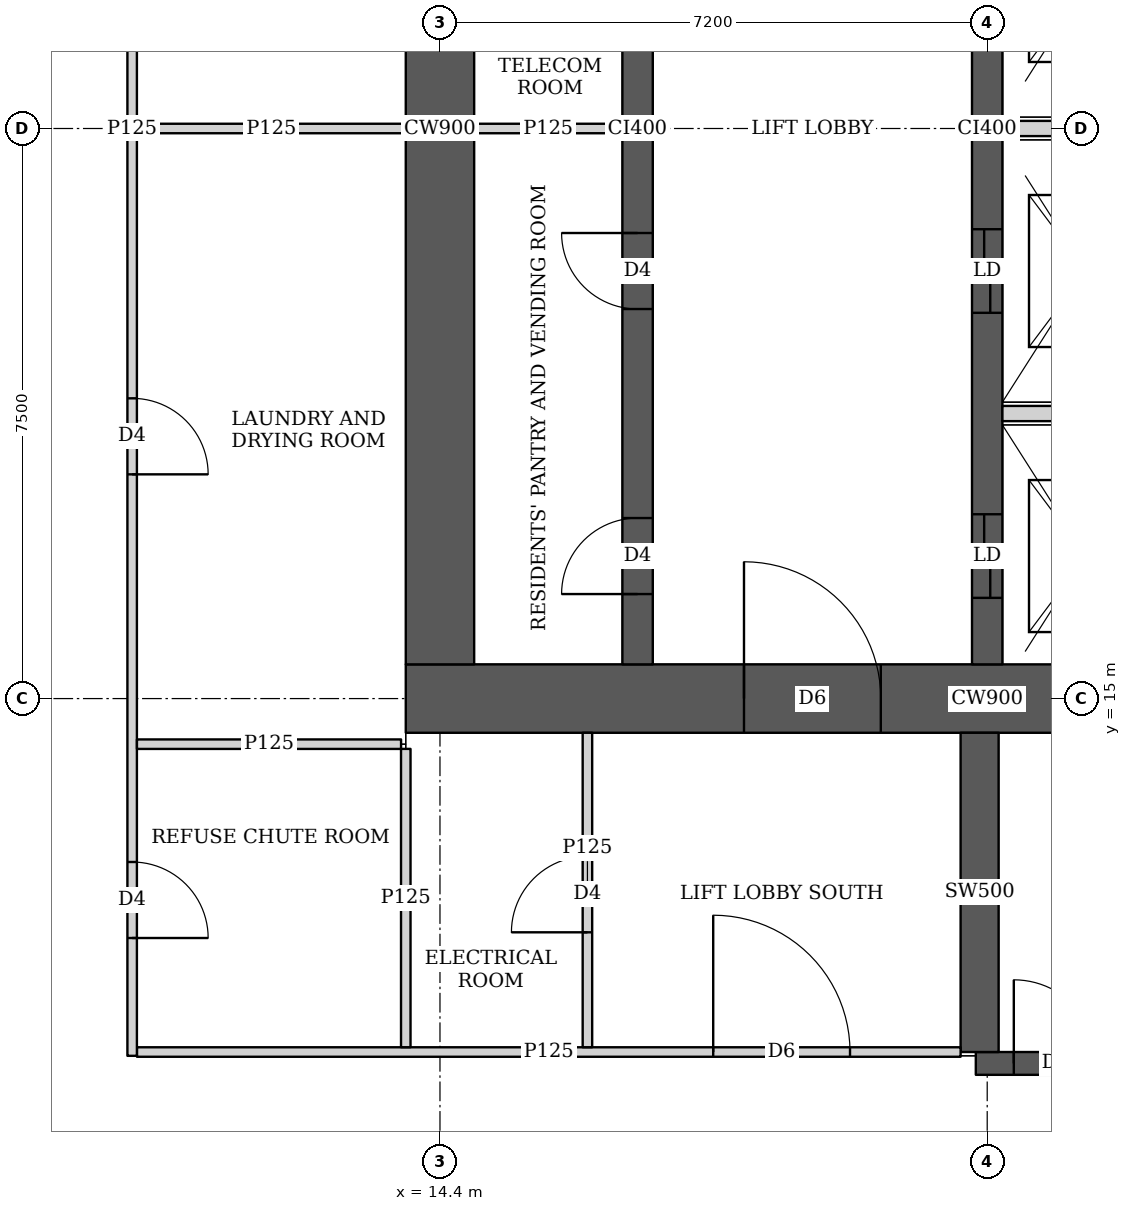
"""IFC4 building model, lengths in metres.
Left out: names, types, materials, properties, quantities, classifications, styles, units other than length and angle.
Written with IfcOpenShell. Run it as: python <this file> out.ifc"""

import sys

from ifc_helpers import new_model, si_unit, direction, frame, frame_2d, origin, place, context, subcontext, project, spatial, rectangle, extrude, element, fill, save


model = new_model("IFC4")
c1 = context("Model", 3, precision=1e-05, world=origin(), true_north=direction((0.0, 1.0)))
c2 = subcontext(c1, "Body", "Model", "MODEL_VIEW")
j1 = project(units=[si_unit("LENGTHUNIT", "METRE"), si_unit("PLANEANGLEUNIT", "RADIAN")], contexts=[c1])
p1 = place(None, origin())
s1 = spatial("IfcSite", under=j1, at=p1, CompositionType="ELEMENT")
p2 = place(p1, origin())
s2 = spatial("IfcBuilding", under=s1, at=p2, CompositionType="ELEMENT")
p3 = place(p2, frame((0.0, 0.0, 184.55)))
s3 = spatial("IfcBuildingStorey", under=s2, at=p3, CompositionType="ELEMENT", Elevation=184.55)
p4 = place(p3, frame((13.95, 15.0, 0.0), z_axis=(0.0, 0.0, 1.0), x_axis=(1.0, 0.0, 0.0)))
e1 = element("IfcWall", 1, at=p4, inside=s3, PredefinedType="SHEAR", context=c2, shape_type="SweptSolid", body=[
    extrude(rectangle(XDim=15.3, YDim=0.9, at=frame_2d((7.65, 0.0))), origin(), (0.0, 0.0, 1.0), 3.75),
])
p5 = place(p4, frame((4.45, 0.0, 0.0)))
e2 = element("IfcOpeningElement", 2, at=p5, cuts=e1, PredefinedType="OPENING", context=c2, shape_type="SweptSolid", body=[
    extrude(rectangle(XDim=1.8, YDim=2.1, at=frame_2d((0.9, 1.05))), frame((0.0, 0.46, 0.0), z_axis=(0.0, -1.0, 0.0), x_axis=(1.0, 0.0, 0.0)), (0.0, 0.0, 1.0), 0.92),
])
p6 = place(p4, frame((10.7, 0.0, 0.0)))
e3 = element("IfcOpeningElement", 3, at=p6, cuts=e1, PredefinedType="OPENING", context=c2, shape_type="SweptSolid", body=[
    extrude(rectangle(XDim=1.1, YDim=2.1, at=frame_2d((0.55, 1.05))), frame((0.0, 0.46, 0.0), z_axis=(0.0, -1.0, 0.0), x_axis=(1.0, 0.0, 0.0)), (0.0, 0.0, 1.0), 0.92),
])
p7 = place(p3, frame((14.4, 15.45, 0.0), z_axis=(0.0, 0.0, 1.0), x_axis=(0.0, 1.0, 0.0)))
e4 = element("IfcWall", 4, at=p7, inside=s3, PredefinedType="SHEAR", context=c2, shape_type="SweptSolid", body=[
    extrude(rectangle(XDim=14.1, YDim=0.9, at=frame_2d((7.05, 0.0))), origin(), (0.0, 0.0, 1.0), 3.75),
])
p8 = place(p3, frame((17.0, 15.45, 0.0), z_axis=(0.0, 0.0, 1.0), x_axis=(0.0, 1.0, 0.0)))
e5 = element("IfcWall", 5, at=p8, inside=s3, PredefinedType="SHEAR", context=c2, shape_type="SweptSolid", body=[
    extrude(rectangle(XDim=14.1, YDim=0.4, at=frame_2d((7.05, 0.0))), origin(), (0.0, 0.0, 1.0), 3.75),
])
p9 = place(p8, frame((0.925, 0.0, 0.0)))
e6 = element("IfcOpeningElement", 6, at=p9, cuts=e5, PredefinedType="OPENING", context=c2, shape_type="SweptSolid", body=[
    extrude(rectangle(XDim=1.0, YDim=2.1, at=frame_2d((0.5, 1.05))), frame((0.0, 0.21, 0.0), z_axis=(0.0, -1.0, 0.0), x_axis=(1.0, 0.0, 0.0)), (0.0, 0.0, 1.0), 0.42),
])
p10 = place(p8, frame((4.675, 0.0, 0.0)))
e7 = element("IfcOpeningElement", 7, at=p10, cuts=e5, PredefinedType="OPENING", context=c2, shape_type="SweptSolid", body=[
    extrude(rectangle(XDim=1.0, YDim=2.1, at=frame_2d((0.5, 1.05))), frame((0.0, 0.21, 0.0), z_axis=(0.0, -1.0, 0.0), x_axis=(1.0, 0.0, 0.0)), (0.0, 0.0, 1.0), 0.42),
])
p11 = place(p8, frame((8.425, 0.0, 0.0)))
e8 = element("IfcOpeningElement", 8, at=p11, cuts=e5, PredefinedType="OPENING", context=c2, shape_type="SweptSolid", body=[
    extrude(rectangle(XDim=1.0, YDim=2.1, at=frame_2d((0.5, 1.05))), frame((0.0, 0.21, 0.0), z_axis=(0.0, -1.0, 0.0), x_axis=(1.0, 0.0, 0.0)), (0.0, 0.0, 1.0), 0.42),
])
p12 = place(p8, frame((12.175, 0.0, 0.0)))
e9 = element("IfcOpeningElement", 9, at=p12, cuts=e5, PredefinedType="OPENING", context=c2, shape_type="SweptSolid", body=[
    extrude(rectangle(XDim=1.0, YDim=2.1, at=frame_2d((0.5, 1.05))), frame((0.0, 0.21, 0.0), z_axis=(0.0, -1.0, 0.0), x_axis=(1.0, 0.0, 0.0)), (0.0, 0.0, 1.0), 0.42),
])
p13 = place(p3, frame((21.6, 15.45, 0.0), z_axis=(0.0, 0.0, 1.0), x_axis=(0.0, 1.0, 0.0)))
e10 = element("IfcWall", 10, at=p13, inside=s3, PredefinedType="SHEAR", context=c2, shape_type="SweptSolid", body=[
    extrude(rectangle(XDim=14.1, YDim=0.4, at=frame_2d((7.05, 0.0))), origin(), (0.0, 0.0, 1.0), 3.75),
])
p14 = place(p13, frame((0.875, 0.0, 0.0)))
e11 = element("IfcOpeningElement", 11, at=p14, cuts=e10, PredefinedType="OPENING", context=c2, shape_type="SweptSolid", body=[
    extrude(rectangle(XDim=1.1, YDim=2.1, at=frame_2d((0.55, 1.05))), frame((0.0, 0.21, 0.0), z_axis=(0.0, -1.0, 0.0), x_axis=(1.0, 0.0, 0.0)), (0.0, 0.0, 1.0), 0.42),
])
p15 = place(p13, frame((4.625, 0.0, 0.0)))
e12 = element("IfcOpeningElement", 12, at=p15, cuts=e10, PredefinedType="OPENING", context=c2, shape_type="SweptSolid", body=[
    extrude(rectangle(XDim=1.1, YDim=2.1, at=frame_2d((0.55, 1.05))), frame((0.0, 0.21, 0.0), z_axis=(0.0, -1.0, 0.0), x_axis=(1.0, 0.0, 0.0)), (0.0, 0.0, 1.0), 0.42),
])
p16 = place(p13, frame((8.375, 0.0, 0.0)))
e13 = element("IfcOpeningElement", 13, at=p16, cuts=e10, PredefinedType="OPENING", context=c2, shape_type="SweptSolid", body=[
    extrude(rectangle(XDim=1.1, YDim=2.1, at=frame_2d((0.55, 1.05))), frame((0.0, 0.21, 0.0), z_axis=(0.0, -1.0, 0.0), x_axis=(1.0, 0.0, 0.0)), (0.0, 0.0, 1.0), 0.42),
])
p17 = place(p13, frame((12.125, 0.0, 0.0)))
e14 = element("IfcOpeningElement", 14, at=p17, cuts=e10, PredefinedType="OPENING", context=c2, shape_type="SweptSolid", body=[
    extrude(rectangle(XDim=1.1, YDim=2.1, at=frame_2d((0.55, 1.05))), frame((0.0, 0.21, 0.0), z_axis=(0.0, -1.0, 0.0), x_axis=(1.0, 0.0, 0.0)), (0.0, 0.0, 1.0), 0.42),
])
p18 = place(p3, frame((21.45, 10.2, 0.0), z_axis=(0.0, 0.0, 1.0), x_axis=(1.0, 0.0, 0.0)))
e15 = element("IfcWall", 15, at=p18, inside=s3, PredefinedType="SHEAR", context=c2, shape_type="SweptSolid", body=[
    extrude(rectangle(XDim=7.5, YDim=0.3, at=frame_2d((3.75, 0.0))), origin(), (0.0, 0.0, 1.0), 3.75),
])
p19 = place(p18, frame((0.5, 0.0, 0.0)))
e16 = element("IfcOpeningElement", 16, at=p19, cuts=e15, PredefinedType="OPENING", context=c2, shape_type="SweptSolid", body=[
    extrude(rectangle(XDim=1.1, YDim=2.1, at=frame_2d((0.55, 1.05))), frame((0.0, 0.16, 0.0), z_axis=(0.0, -1.0, 0.0), x_axis=(1.0, 0.0, 0.0)), (0.0, 0.0, 1.0), 0.32),
])
p20 = place(p3, frame((21.5, 10.35, 0.0), z_axis=(0.0, 0.0, 1.0), x_axis=(0.0, 1.0, 0.0)))
e17 = element("IfcWall", 17, at=p20, inside=s3, PredefinedType="SHEAR", context=c2, shape_type="SweptSolid", body=[
    extrude(rectangle(XDim=4.2, YDim=0.5, at=frame_2d((2.1, 0.0))), origin(), (0.0, 0.0, 1.0), 3.75),
])
p21 = place(p3, frame((10.35, 10.3, 0.0), z_axis=(0.0, 0.0, 1.0), x_axis=(0.0, 1.0, 0.0)))
e18 = element("IfcWall", 18, at=p21, inside=s3, PredefinedType="PARTITIONING", context=c2, shape_type="SweptSolid", body=[
    extrude(rectangle(XDim=24.4, YDim=0.125, at=frame_2d((12.2, 0.0))), origin(), (0.0, 0.0, 1.0), 3.45),
])
p22 = place(p21, frame((1.55, 0.0, 0.0)))
e19 = element("IfcOpeningElement", 19, at=p22, cuts=e18, PredefinedType="OPENING", context=c2, shape_type="SweptSolid", body=[
    extrude(rectangle(XDim=1.0, YDim=2.1, at=frame_2d((0.5, 1.05))), frame((0.0, 0.073, 0.0), z_axis=(0.0, -1.0, 0.0), x_axis=(1.0, 0.0, 0.0)), (0.0, 0.0, 1.0), 0.145),
])
p23 = place(p21, frame((7.65, 0.0, 0.0)))
e20 = element("IfcOpeningElement", 20, at=p23, cuts=e18, PredefinedType="OPENING", context=c2, shape_type="SweptSolid", body=[
    extrude(rectangle(XDim=1.0, YDim=2.1, at=frame_2d((0.5, 1.05))), frame((0.0, 0.073, 0.0), z_axis=(0.0, -1.0, 0.0), x_axis=(1.0, 0.0, 0.0)), (0.0, 0.0, 1.0), 0.145),
])
p24 = place(p21, frame((15.75, 0.0, 0.0)))
e21 = element("IfcOpeningElement", 21, at=p24, cuts=e18, PredefinedType="OPENING", context=c2, shape_type="SweptSolid", body=[
    extrude(rectangle(XDim=1.0, YDim=2.1, at=frame_2d((0.5, 1.05))), frame((0.0, 0.073, 0.0), z_axis=(0.0, -1.0, 0.0), x_axis=(1.0, 0.0, 0.0)), (0.0, 0.0, 1.0), 0.145),
])
p25 = place(p21, frame((21.85, 0.0, 0.0)))
e22 = element("IfcOpeningElement", 22, at=p25, cuts=e18, PredefinedType="OPENING", context=c2, shape_type="SweptSolid", body=[
    extrude(rectangle(XDim=1.0, YDim=2.1, at=frame_2d((0.5, 1.05))), frame((0.0, 0.073, 0.0), z_axis=(0.0, -1.0, 0.0), x_axis=(1.0, 0.0, 0.0)), (0.0, 0.0, 1.0), 0.145),
])
p26 = place(p3, frame((10.413, 14.4, 0.0), z_axis=(0.0, 0.0, 1.0), x_axis=(1.0, 0.0, 0.0)))
e23 = element("IfcWall", 23, at=p26, inside=s3, PredefinedType="PARTITIONING", context=c2, shape_type="SweptSolid", body=[
    extrude(rectangle(XDim=3.475, YDim=0.125, at=frame_2d((1.737, 0.0))), origin(), (0.0, 0.0, 1.0), 3.45),
])
p27 = place(p3, frame((10.413, 22.5, 0.0), z_axis=(0.0, 0.0, 1.0), x_axis=(1.0, 0.0, 0.0)))
e24 = element("IfcWall", 24, at=p27, inside=s3, PredefinedType="PARTITIONING", context=c2, shape_type="SweptSolid", body=[
    extrude(rectangle(XDim=3.537, YDim=0.125, at=frame_2d((1.769, 0.0))), origin(), (0.0, 0.0, 1.0), 3.45),
])
p28 = place(p3, frame((13.95, 10.413, 0.0), z_axis=(0.0, 0.0, 1.0), x_axis=(0.0, 1.0, 0.0)))
e25 = element("IfcWall", 25, at=p28, inside=s3, PredefinedType="PARTITIONING", context=c2, shape_type="SweptSolid", body=[
    extrude(rectangle(XDim=3.925, YDim=0.125, at=frame_2d((1.962, 0.0))), origin(), (0.0, 0.0, 1.0), 3.45),
])
p29 = place(p3, frame((10.413, 10.35, 0.0), z_axis=(0.0, 0.0, 1.0), x_axis=(1.0, 0.0, 0.0)))
e26 = element("IfcWall", 26, at=p29, inside=s3, PredefinedType="PARTITIONING", context=c2, shape_type="SweptSolid", body=[
    extrude(rectangle(XDim=10.837, YDim=0.125, at=frame_2d((5.418, 0.0))), origin(), (0.0, 0.0, 1.0), 3.45),
])
p30 = place(p29, frame((7.582, 0.0, 0.0)))
e27 = element("IfcOpeningElement", 27, at=p30, cuts=e26, PredefinedType="OPENING", context=c2, shape_type="SweptSolid", body=[
    extrude(rectangle(XDim=1.8, YDim=2.1, at=frame_2d((0.9, 1.05))), frame((0.0, 0.073, 0.0), z_axis=(0.0, -1.0, 0.0), x_axis=(1.0, 0.0, 0.0)), (0.0, 0.0, 1.0), 0.145),
])
p31 = place(p3, frame((16.34, 10.413, 0.0), z_axis=(0.0, 0.0, 1.0), x_axis=(0.0, 1.0, 0.0)))
e28 = element("IfcWall", 28, at=p31, inside=s3, PredefinedType="PARTITIONING", context=c2, shape_type="SweptSolid", body=[
    extrude(rectangle(XDim=4.137, YDim=0.125, at=frame_2d((2.068, 0.0))), origin(), (0.0, 0.0, 1.0), 3.45),
])
p32 = place(p31, frame((1.512, 0.0, 0.0)))
e29 = element("IfcOpeningElement", 29, at=p32, cuts=e28, PredefinedType="OPENING", context=c2, shape_type="SweptSolid", body=[
    extrude(rectangle(XDim=1.0, YDim=2.1, at=frame_2d((0.5, 1.05))), frame((0.0, 0.073, 0.0), z_axis=(0.0, -1.0, 0.0), x_axis=(1.0, 0.0, 0.0)), (0.0, 0.0, 1.0), 0.145),
])
p33 = place(p3, frame((14.85, 22.5, 0.0), z_axis=(0.0, 0.0, 1.0), x_axis=(1.0, 0.0, 0.0)))
e30 = element("IfcWall", 30, at=p33, inside=s3, PredefinedType="PARTITIONING", context=c2, shape_type="SweptSolid", body=[
    extrude(rectangle(XDim=1.95, YDim=0.125, at=frame_2d((0.975, 0.0))), origin(), (0.0, 0.0, 1.0), 3.45),
])
for number, where, z_axis, x_axis in (
    (31, (21.8, 18.75, 0.0), (0.0, 0.0, 1.0), (1.0, 0.0, 0.0)),
    (32, (21.8, 22.5, 0.0), (0.0, 0.0, 1.0), (1.0, 0.0, 0.0)),
):
    element("IfcWall", number, at=place(p3, frame(where, z_axis=z_axis, x_axis=x_axis)), inside=s3, PredefinedType="SOLIDWALL", context=c2, shape_type="SweptSolid", body=[
        extrude(rectangle(XDim=2.2, YDim=0.2, at=frame_2d((1.1, 0.0))), origin(), (0.0, 0.0, 1.0), 3.45),
    ])
p34 = place(p22, origin())
e33 = element("IfcDoor", 33, at=p34, inside=s3, OperationType="SINGLE_SWING_RIGHT", PredefinedType="DOOR", context=c2, shape_type="SweptSolid", body=[
    extrude(rectangle(XDim=1.0, YDim=2.1, at=frame_2d((0.5, 1.05))), frame((0.0, 0.025, 0.0), z_axis=(0.0, -1.0, 0.0), x_axis=(1.0, 0.0, 0.0)), (0.0, 0.0, 1.0), 0.05),
])
fill(e19, e33)
p35 = place(p23, origin())
e34 = element("IfcDoor", 34, at=p35, inside=s3, OperationType="SINGLE_SWING_RIGHT", PredefinedType="DOOR", context=c2, shape_type="SweptSolid", body=[
    extrude(rectangle(XDim=1.0, YDim=2.1, at=frame_2d((0.5, 1.05))), frame((0.0, 0.025, 0.0), z_axis=(0.0, -1.0, 0.0), x_axis=(1.0, 0.0, 0.0)), (0.0, 0.0, 1.0), 0.05),
])
fill(e20, e34)
p36 = place(p32, origin())
e35 = element("IfcDoor", 35, at=p36, inside=s3, OperationType="SINGLE_SWING_LEFT", PredefinedType="DOOR", context=c2, shape_type="SweptSolid", body=[
    extrude(rectangle(XDim=1.0, YDim=2.1, at=frame_2d((0.5, 1.05))), frame((0.0, 0.025, 0.0), z_axis=(0.0, -1.0, 0.0), x_axis=(1.0, 0.0, 0.0)), (0.0, 0.0, 1.0), 0.05),
])
fill(e29, e35)
p37 = place(p30, origin())
e36 = element("IfcDoor", 36, at=p37, inside=s3, OperationType="DOUBLE_DOOR_SINGLE_SWING", PredefinedType="DOOR", context=c2, shape_type="SweptSolid", body=[
    extrude(rectangle(XDim=1.8, YDim=2.1, at=frame_2d((0.9, 1.05))), frame((0.0, 0.025, 0.0), z_axis=(0.0, -1.0, 0.0), x_axis=(1.0, 0.0, 0.0)), (0.0, 0.0, 1.0), 0.05),
])
fill(e27, e36)
p38 = place(p9, origin())
e37 = element("IfcDoor", 37, at=p38, inside=s3, OperationType="SINGLE_SWING_LEFT", PredefinedType="DOOR", context=c2, shape_type="SweptSolid", body=[
    extrude(rectangle(XDim=1.0, YDim=2.1, at=frame_2d((0.5, 1.05))), frame((0.0, 0.025, 0.0), z_axis=(0.0, -1.0, 0.0), x_axis=(1.0, 0.0, 0.0)), (0.0, 0.0, 1.0), 0.05),
])
fill(e6, e37)
p39 = place(p10, origin())
e38 = element("IfcDoor", 38, at=p39, inside=s3, OperationType="SINGLE_SWING_RIGHT", PredefinedType="DOOR", context=c2, shape_type="SweptSolid", body=[
    extrude(rectangle(XDim=1.0, YDim=2.1, at=frame_2d((0.5, 1.05))), frame((0.0, 0.025, 0.0), z_axis=(0.0, -1.0, 0.0), x_axis=(1.0, 0.0, 0.0)), (0.0, 0.0, 1.0), 0.05),
])
fill(e7, e38)
p40 = place(p5, origin())
e39 = element("IfcDoor", 39, at=p40, inside=s3, OperationType="DOUBLE_DOOR_SINGLE_SWING", PredefinedType="DOOR", context=c2, shape_type="SweptSolid", body=[
    extrude(rectangle(XDim=1.8, YDim=2.1, at=frame_2d((0.9, 1.05))), frame((0.0, 0.025, 0.0), z_axis=(0.0, -1.0, 0.0), x_axis=(1.0, 0.0, 0.0)), (0.0, 0.0, 1.0), 0.05),
])
fill(e2, e39)
p41 = place(p14, origin())
e40 = element("IfcDoor", 40, at=p41, inside=s3, OperationType="DOUBLE_DOOR_SLIDING", PredefinedType="DOOR", context=c2, shape_type="SweptSolid", body=[
    extrude(rectangle(XDim=1.1, YDim=2.1, at=frame_2d((0.55, 1.05))), frame((0.0, 0.025, 0.0), z_axis=(0.0, -1.0, 0.0), x_axis=(1.0, 0.0, 0.0)), (0.0, 0.0, 1.0), 0.05),
])
fill(e11, e40)
p42 = place(p15, origin())
e41 = element("IfcDoor", 41, at=p42, inside=s3, OperationType="DOUBLE_DOOR_SLIDING", PredefinedType="DOOR", context=c2, shape_type="SweptSolid", body=[
    extrude(rectangle(XDim=1.1, YDim=2.1, at=frame_2d((0.55, 1.05))), frame((0.0, 0.025, 0.0), z_axis=(0.0, -1.0, 0.0), x_axis=(1.0, 0.0, 0.0)), (0.0, 0.0, 1.0), 0.05),
])
fill(e12, e41)
p43 = place(p19, origin())
e42 = element("IfcDoor", 42, at=p43, inside=s3, OperationType="SINGLE_SWING_LEFT", PredefinedType="DOOR", context=c2, shape_type="SweptSolid", body=[
    extrude(rectangle(XDim=1.1, YDim=2.1, at=frame_2d((0.55, 1.05))), frame((0.0, 0.025, 0.0), z_axis=(0.0, -1.0, 0.0), x_axis=(1.0, 0.0, 0.0)), (0.0, 0.0, 1.0), 0.05),
])
fill(e16, e42)
save(model, sys.argv[1])
